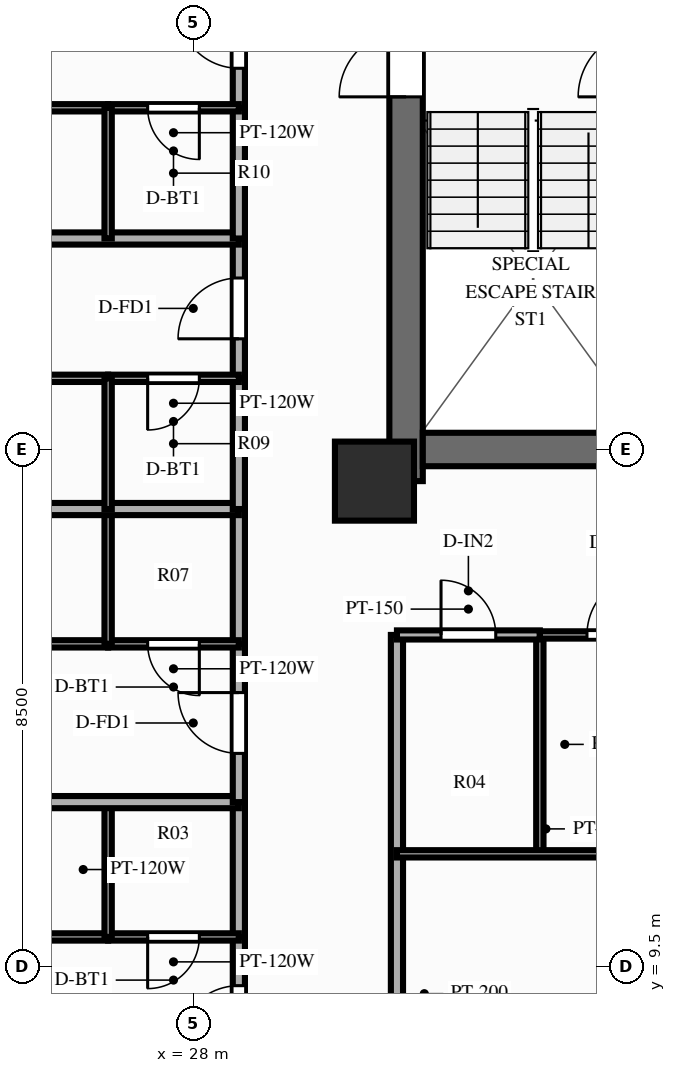
"""IFC4 building model, lengths in metres.
Left out: names, types, materials, properties, quantities, classifications, styles, units other than length and angle.
Written with IfcOpenShell. Run it as: python <this file> out.ifc"""

import sys

from ifc_helpers import new_model, si_unit, direction, frame, frame_2d, origin, origin_2d, place, context, subcontext, project, spatial, rectangle, extrude, source, transform, mapped, element, fill, save


model = new_model("IFC4")
c1 = context("Model", 3, precision=1e-05, world=origin(), true_north=direction((0.0, 1.0)))
c2 = subcontext(c1, "Body", "Model", "MODEL_VIEW")
j1 = project(units=[si_unit("LENGTHUNIT", "METRE"), si_unit("PLANEANGLEUNIT", "RADIAN")], contexts=[c1])
p1 = place(None, origin())
s1 = spatial("IfcSite", under=j1, at=p1, CompositionType="ELEMENT")
p2 = place(p1, origin())
s2 = spatial("IfcBuilding", under=s1, at=p2, CompositionType="ELEMENT")
p3 = place(p2, frame((0.0, 0.0, 126.75)))
s3 = spatial("IfcBuildingStorey", under=s2, at=p3, CompositionType="ELEMENT", Elevation=126.75)
p4 = place(p3, frame((31.5, 17.48, 0.0), z_axis=(0.0, 0.0, 1.0), x_axis=(0.0, 1.0, 0.0)))
e1 = element("IfcWall", 1, at=p4, inside=s3, PredefinedType="SHEAR", context=c2, shape_type="SweptSolid", body=[
    extrude(rectangle(XDim=19.04, YDim=0.55, at=frame_2d((9.52, 0.0))), origin(), (0.0, 0.0, 1.0), 3.0),
])
p5 = place(p4, frame((6.32, 0.0, 0.0)))
e2 = element("IfcOpeningElement", 2, at=p5, cuts=e1, PredefinedType="OPENING", context=c2, shape_type="SweptSolid", body=[
    extrude(rectangle(XDim=1.1, YDim=2.15, at=frame_2d((0.55, 1.075))), frame((0.0, 0.287, 0.0), z_axis=(0.0, -1.0, 0.0), x_axis=(1.0, 0.0, 0.0)), (0.0, 0.0, 1.0), 0.574),
])
p6 = place(p3, frame((31.775, 18.0, 0.0), z_axis=(0.0, 0.0, 1.0), x_axis=(1.0, 0.0, 0.0)))
e3 = element("IfcWall", 3, at=p6, inside=s3, PredefinedType="SHEAR", context=c2, shape_type="SweptSolid", body=[
    extrude(rectangle(XDim=12.45, YDim=0.55, at=frame_2d((6.225, 0.0))), origin(), (0.0, 0.0, 1.0), 3.0),
])
m1 = source(origin(), c2, "Body", "SweptSolid", [
    extrude(rectangle(XDim=1.3, YDim=1.3, at=origin_2d()), origin(), (0.0, 0.0, 1.0), 3.0),
])
p7 = place(p3, frame((30.98, 17.48, 0.0), z_axis=(0.0, 0.0, 1.0), x_axis=(1.0, 0.0, 0.0)))
e4 = element("IfcColumn", 4, at=p7, inside=s3, PredefinedType="COLUMN", context=c2, shape_type="MappedRepresentation", body=[
    mapped(m1, transform((0.0, 0.0, 0.0), scale=1.0)),
])
p8 = place(p3, frame((31.35, 14.95, 0.0), z_axis=(0.0, 0.0, 1.0), x_axis=(0.0, -1.0, 0.0)))
e5 = element("IfcWall", 5, at=p8, inside=s3, PredefinedType="PARTITIONING", context=c2, shape_type="SweptSolid", body=[
    extrude(rectangle(XDim=11.8, YDim=0.2, at=frame_2d((5.9, 0.0))), origin(), (0.0, 0.0, 1.0), 2.34),
])
p9 = place(p3, frame((33.7, 14.95, 0.0), z_axis=(0.0, 0.0, 1.0), x_axis=(0.0, -1.0, 0.0)))
e6 = element("IfcWall", 6, at=p9, inside=s3, PredefinedType="PARTITIONING", context=c2, shape_type="SweptSolid", body=[
    extrude(rectangle(XDim=3.6, YDim=0.12, at=frame_2d((1.8, 0.0))), origin(), (0.0, 0.0, 1.0), 2.79),
])
p10 = place(p3, frame((31.35, 11.35, 0.0), z_axis=(0.0, 0.0, 1.0), x_axis=(1.0, 0.0, 0.0)))
e7 = element("IfcWall", 7, at=p10, inside=s3, PredefinedType="PARTITIONING", context=c2, shape_type="SweptSolid", body=[
    extrude(rectangle(XDim=4.9, YDim=0.12, at=frame_2d((2.45, 0.0))), origin(), (0.0, 0.0, 1.0), 2.79),
])
p11 = place(p3, frame((31.35, 14.95, 0.0), z_axis=(0.0, 0.0, 1.0), x_axis=(1.0, 0.0, 0.0)))
e8 = element("IfcWall", 8, at=p11, inside=s3, PredefinedType="PARTITIONING", context=c2, shape_type="SweptSolid", body=[
    extrude(rectangle(XDim=2.35, YDim=0.15, at=frame_2d((1.175, 0.0))), origin(), (0.0, 0.0, 1.0), 2.79),
])
p12 = place(p11, frame((0.725, 0.0, 0.0)))
e9 = element("IfcOpeningElement", 9, at=p12, cuts=e8, PredefinedType="OPENING", context=c2, shape_type="SweptSolid", body=[
    extrude(rectangle(XDim=0.9, YDim=2.1, at=frame_2d((0.45, 1.05))), frame((0.0, 0.087, 0.0), z_axis=(0.0, -1.0, 0.0), x_axis=(1.0, 0.0, 0.0)), (0.0, 0.0, 1.0), 0.174),
])
p13 = place(p3, frame((33.7, 14.95, 0.0), z_axis=(0.0, 0.0, 1.0), x_axis=(1.0, 0.0, 0.0)))
e10 = element("IfcWall", 10, at=p13, inside=s3, PredefinedType="PARTITIONING", context=c2, shape_type="SweptSolid", body=[
    extrude(rectangle(XDim=2.55, YDim=0.12, at=frame_2d((1.275, 0.0))), origin(), (0.0, 0.0, 1.0), 2.79),
])
p14 = place(p13, frame((0.775, 0.0, 0.0)))
e11 = element("IfcOpeningElement", 11, at=p14, cuts=e10, PredefinedType="OPENING", context=c2, shape_type="SweptSolid", body=[
    extrude(rectangle(XDim=1.0, YDim=2.1, at=frame_2d((0.5, 1.05))), frame((0.0, 0.072, 0.0), z_axis=(0.0, -1.0, 0.0), x_axis=(1.0, 0.0, 0.0)), (0.0, 0.0, 1.0), 0.144),
])
p15 = place(p3, frame((28.75, 7.38, 0.0), z_axis=(0.0, 0.0, 1.0), x_axis=(0.0, 1.0, 0.0)))
e12 = element("IfcWall", 12, at=p15, inside=s3, PredefinedType="PARTITIONING", context=c2, shape_type="SweptSolid", body=[
    extrude(rectangle(XDim=2.603, YDim=0.2, at=frame_2d((1.302, 0.0))), origin(), (0.0, 0.0, 1.0), 2.79),
])
p16 = place(p15, frame((0.802, 0.0, 0.0)))
e13 = element("IfcOpeningElement", 13, at=p16, cuts=e12, PredefinedType="OPENING", context=c2, shape_type="SweptSolid", body=[
    extrude(rectangle(XDim=1.0, YDim=2.15, at=frame_2d((0.5, 1.075))), frame((0.0, 0.112, 0.0), z_axis=(0.0, -1.0, 0.0), x_axis=(1.0, 0.0, 0.0)), (0.0, 0.0, 1.0), 0.224),
])
p17 = place(p3, frame((28.75, 9.983, 0.0), z_axis=(0.0, 0.0, 1.0), x_axis=(0.0, 1.0, 0.0)))
e14 = element("IfcWall", 14, at=p17, inside=s3, PredefinedType="PARTITIONING", context=c2, shape_type="SweptSolid", body=[
    extrude(rectangle(XDim=2.218, YDim=0.2, at=frame_2d((1.109, 0.0))), origin(), (0.0, 0.0, 1.0), 2.79),
])
p18 = place(p3, frame((28.75, 9.983, 0.0), z_axis=(0.0, 0.0, 1.0), x_axis=(-1.0, 0.0, 0.0)))
e15 = element("IfcWall", 15, at=p18, inside=s3, PredefinedType="PARTITIONING", context=c2, shape_type="SweptSolid", body=[
    extrude(rectangle(XDim=2.15, YDim=0.12, at=frame_2d((1.075, 0.0))), origin(), (0.0, 0.0, 1.0), 2.79),
])
p19 = place(p18, frame((0.65, 0.0, 0.0)))
e16 = element("IfcOpeningElement", 16, at=p19, cuts=e15, PredefinedType="OPENING", context=c2, shape_type="SweptSolid", body=[
    extrude(rectangle(XDim=0.85, YDim=2.05, at=frame_2d((0.425, 1.025))), frame((0.0, 0.072, 0.0), z_axis=(0.0, -1.0, 0.0), x_axis=(1.0, 0.0, 0.0)), (0.0, 0.0, 1.0), 0.144),
])
p20 = place(p3, frame((26.6, 9.983, 0.0), z_axis=(0.0, 0.0, 1.0), x_axis=(-1.0, 0.0, 0.0)))
e17 = element("IfcWall", 17, at=p20, inside=s3, PredefinedType="PARTITIONING", context=c2, shape_type="SweptSolid", body=[
    extrude(rectangle(XDim=1.09, YDim=0.12, at=frame_2d((0.545, 0.0))), origin(), (0.0, 0.0, 1.0), 2.79),
])
p21 = place(p3, frame((26.6, 9.983, 0.0), z_axis=(0.0, 0.0, 1.0), x_axis=(0.0, 1.0, 0.0)))
e18 = element("IfcWall", 18, at=p21, inside=s3, PredefinedType="PARTITIONING", context=c2, shape_type="SweptSolid", body=[
    extrude(rectangle(XDim=2.218, YDim=0.12, at=frame_2d((1.109, 0.0))), origin(), (0.0, 0.0, 1.0), 2.79),
])
p22 = place(p3, frame((28.75, 12.2, 0.0), z_axis=(0.0, 0.0, 1.0), x_axis=(-1.0, 0.0, 0.0)))
e19 = element("IfcWall", 19, at=p22, inside=s3, PredefinedType="PARTITIONING", context=c2, shape_type="SweptSolid", body=[
    extrude(rectangle(XDim=16.6, YDim=0.2, at=frame_2d((8.3, 0.0))), origin(), (0.0, 0.0, 1.0), 2.79),
])
p23 = place(p3, frame((28.75, 12.2, 0.0), z_axis=(0.0, 0.0, 1.0), x_axis=(0.0, 1.0, 0.0)))
e20 = element("IfcWall", 20, at=p23, inside=s3, PredefinedType="PARTITIONING", context=c2, shape_type="SweptSolid", body=[
    extrude(rectangle(XDim=2.603, YDim=0.2, at=frame_2d((1.302, 0.0))), origin(), (0.0, 0.0, 1.0), 2.79),
])
p24 = place(p23, frame((0.802, 0.0, 0.0)))
e21 = element("IfcOpeningElement", 21, at=p24, cuts=e20, PredefinedType="OPENING", context=c2, shape_type="SweptSolid", body=[
    extrude(rectangle(XDim=1.0, YDim=2.15, at=frame_2d((0.5, 1.075))), frame((0.0, 0.112, 0.0), z_axis=(0.0, -1.0, 0.0), x_axis=(1.0, 0.0, 0.0)), (0.0, 0.0, 1.0), 0.224),
])
p25 = place(p3, frame((28.75, 14.803, 0.0), z_axis=(0.0, 0.0, 1.0), x_axis=(0.0, 1.0, 0.0)))
e22 = element("IfcWall", 22, at=p25, inside=s3, PredefinedType="PARTITIONING", context=c2, shape_type="SweptSolid", body=[
    extrude(rectangle(XDim=2.217, YDim=0.2, at=frame_2d((1.109, 0.0))), origin(), (0.0, 0.0, 1.0), 2.79),
])
p26 = place(p3, frame((28.75, 14.803, 0.0), z_axis=(0.0, 0.0, 1.0), x_axis=(-1.0, 0.0, 0.0)))
e23 = element("IfcWall", 23, at=p26, inside=s3, PredefinedType="PARTITIONING", context=c2, shape_type="SweptSolid", body=[
    extrude(rectangle(XDim=2.15, YDim=0.12, at=frame_2d((1.075, 0.0))), origin(), (0.0, 0.0, 1.0), 2.79),
])
p27 = place(p26, frame((0.65, 0.0, 0.0)))
e24 = element("IfcOpeningElement", 24, at=p27, cuts=e23, PredefinedType="OPENING", context=c2, shape_type="SweptSolid", body=[
    extrude(rectangle(XDim=0.85, YDim=2.05, at=frame_2d((0.425, 1.025))), frame((0.0, 0.072, 0.0), z_axis=(0.0, -1.0, 0.0), x_axis=(1.0, 0.0, 0.0)), (0.0, 0.0, 1.0), 0.144),
])
p28 = place(p3, frame((26.6, 14.803, 0.0), z_axis=(0.0, 0.0, 1.0), x_axis=(-1.0, 0.0, 0.0)))
e25 = element("IfcWall", 25, at=p28, inside=s3, PredefinedType="PARTITIONING", context=c2, shape_type="SweptSolid", body=[
    extrude(rectangle(XDim=1.09, YDim=0.12, at=frame_2d((0.545, 0.0))), origin(), (0.0, 0.0, 1.0), 2.79),
])
p29 = place(p3, frame((26.6, 14.803, 0.0), z_axis=(0.0, 0.0, 1.0), x_axis=(0.0, 1.0, 0.0)))
e26 = element("IfcWall", 26, at=p29, inside=s3, PredefinedType="PARTITIONING", context=c2, shape_type="SweptSolid", body=[
    extrude(rectangle(XDim=2.217, YDim=0.12, at=frame_2d((1.109, 0.0))), origin(), (0.0, 0.0, 1.0), 2.79),
])
p30 = place(p3, frame((28.75, 17.021, 0.0), z_axis=(0.0, 0.0, 1.0), x_axis=(-1.0, 0.0, 0.0)))
e27 = element("IfcWall", 27, at=p30, inside=s3, PredefinedType="PARTITIONING", context=c2, shape_type="SweptSolid", body=[
    extrude(rectangle(XDim=16.6, YDim=0.2, at=frame_2d((8.3, 0.0))), origin(), (0.0, 0.0, 1.0), 2.34),
])
p31 = place(p3, frame((28.75, 17.021, 0.0), z_axis=(0.0, 0.0, 1.0), x_axis=(0.0, 1.0, 0.0)))
e28 = element("IfcWall", 28, at=p31, inside=s3, PredefinedType="PARTITIONING", context=c2, shape_type="SweptSolid", body=[
    extrude(rectangle(XDim=2.15, YDim=0.2, at=frame_2d((1.075, 0.0))), origin(), (0.0, 0.0, 1.0), 2.79),
])
p32 = place(p3, frame((28.75, 19.171, 0.0), z_axis=(0.0, 0.0, 1.0), x_axis=(0.0, 1.0, 0.0)))
e29 = element("IfcWall", 29, at=p32, inside=s3, PredefinedType="PARTITIONING", context=c2, shape_type="SweptSolid", body=[
    extrude(rectangle(XDim=2.3, YDim=0.2, at=frame_2d((1.15, 0.0))), origin(), (0.0, 0.0, 1.0), 2.79),
])
p33 = place(p32, frame((0.65, 0.0, 0.0)))
e30 = element("IfcOpeningElement", 30, at=p33, cuts=e29, PredefinedType="OPENING", context=c2, shape_type="SweptSolid", body=[
    extrude(rectangle(XDim=1.0, YDim=2.15, at=frame_2d((0.5, 1.075))), frame((0.0, 0.112, 0.0), z_axis=(0.0, -1.0, 0.0), x_axis=(1.0, 0.0, 0.0)), (0.0, 0.0, 1.0), 0.224),
])
p34 = place(p3, frame((28.75, 19.171, 0.0), z_axis=(0.0, 0.0, 1.0), x_axis=(-1.0, 0.0, 0.0)))
e31 = element("IfcWall", 31, at=p34, inside=s3, PredefinedType="PARTITIONING", context=c2, shape_type="SweptSolid", body=[
    extrude(rectangle(XDim=2.15, YDim=0.12, at=frame_2d((1.075, 0.0))), origin(), (0.0, 0.0, 1.0), 2.79),
])
p35 = place(p34, frame((0.65, 0.0, 0.0)))
e32 = element("IfcOpeningElement", 32, at=p35, cuts=e31, PredefinedType="OPENING", context=c2, shape_type="SweptSolid", body=[
    extrude(rectangle(XDim=0.85, YDim=2.05, at=frame_2d((0.425, 1.025))), frame((0.0, 0.072, 0.0), z_axis=(0.0, -1.0, 0.0), x_axis=(1.0, 0.0, 0.0)), (0.0, 0.0, 1.0), 0.144),
])
p36 = place(p3, frame((26.6, 19.171, 0.0), z_axis=(0.0, 0.0, 1.0), x_axis=(-1.0, 0.0, 0.0)))
e33 = element("IfcWall", 33, at=p36, inside=s3, PredefinedType="PARTITIONING", context=c2, shape_type="SweptSolid", body=[
    extrude(rectangle(XDim=1.09, YDim=0.12, at=frame_2d((0.545, 0.0))), origin(), (0.0, 0.0, 1.0), 2.79),
])
p37 = place(p3, frame((26.6, 17.021, 0.0), z_axis=(0.0, 0.0, 1.0), x_axis=(0.0, 1.0, 0.0)))
e34 = element("IfcWall", 34, at=p37, inside=s3, PredefinedType="PARTITIONING", context=c2, shape_type="SweptSolid", body=[
    extrude(rectangle(XDim=2.15, YDim=0.12, at=frame_2d((1.075, 0.0))), origin(), (0.0, 0.0, 1.0), 2.79),
])
p38 = place(p3, frame((28.75, 21.47, 0.0), z_axis=(0.0, 0.0, 1.0), x_axis=(-1.0, 0.0, 0.0)))
e35 = element("IfcWall", 35, at=p38, inside=s3, PredefinedType="PARTITIONING", context=c2, shape_type="SweptSolid", body=[
    extrude(rectangle(XDim=16.6, YDim=0.2, at=frame_2d((8.3, 0.0))), origin(), (0.0, 0.0, 1.0), 2.79),
])
p39 = place(p3, frame((28.75, 21.47, 0.0), z_axis=(0.0, 0.0, 1.0), x_axis=(0.0, 1.0, 0.0)))
e36 = element("IfcWall", 36, at=p39, inside=s3, PredefinedType="PARTITIONING", context=c2, shape_type="SweptSolid", body=[
    extrude(rectangle(XDim=2.15, YDim=0.2, at=frame_2d((1.075, 0.0))), origin(), (0.0, 0.0, 1.0), 2.79),
])
p40 = place(p3, frame((28.75, 23.62, 0.0), z_axis=(0.0, 0.0, 1.0), x_axis=(0.0, 1.0, 0.0)))
e37 = element("IfcWall", 37, at=p40, inside=s3, PredefinedType="PARTITIONING", context=c2, shape_type="SweptSolid", body=[
    extrude(rectangle(XDim=2.3, YDim=0.2, at=frame_2d((1.15, 0.0))), origin(), (0.0, 0.0, 1.0), 2.79),
])
p41 = place(p40, frame((0.65, 0.0, 0.0)))
e38 = element("IfcOpeningElement", 38, at=p41, cuts=e37, PredefinedType="OPENING", context=c2, shape_type="SweptSolid", body=[
    extrude(rectangle(XDim=1.0, YDim=2.15, at=frame_2d((0.5, 1.075))), frame((0.0, 0.112, 0.0), z_axis=(0.0, -1.0, 0.0), x_axis=(1.0, 0.0, 0.0)), (0.0, 0.0, 1.0), 0.224),
])
p42 = place(p3, frame((28.75, 23.62, 0.0), z_axis=(0.0, 0.0, 1.0), x_axis=(-1.0, 0.0, 0.0)))
e39 = element("IfcWall", 39, at=p42, inside=s3, PredefinedType="PARTITIONING", context=c2, shape_type="SweptSolid", body=[
    extrude(rectangle(XDim=2.15, YDim=0.12, at=frame_2d((1.075, 0.0))), origin(), (0.0, 0.0, 1.0), 2.79),
])
p43 = place(p42, frame((0.65, 0.0, 0.0)))
e40 = element("IfcOpeningElement", 40, at=p43, cuts=e39, PredefinedType="OPENING", context=c2, shape_type="SweptSolid", body=[
    extrude(rectangle(XDim=0.85, YDim=2.05, at=frame_2d((0.425, 1.025))), frame((0.0, 0.072, 0.0), z_axis=(0.0, -1.0, 0.0), x_axis=(1.0, 0.0, 0.0)), (0.0, 0.0, 1.0), 0.144),
])
p44 = place(p3, frame((26.6, 23.62, 0.0), z_axis=(0.0, 0.0, 1.0), x_axis=(-1.0, 0.0, 0.0)))
e41 = element("IfcWall", 41, at=p44, inside=s3, PredefinedType="PARTITIONING", context=c2, shape_type="SweptSolid", body=[
    extrude(rectangle(XDim=1.09, YDim=0.12, at=frame_2d((0.545, 0.0))), origin(), (0.0, 0.0, 1.0), 2.79),
])
p45 = place(p3, frame((26.6, 21.47, 0.0), z_axis=(0.0, 0.0, 1.0), x_axis=(0.0, 1.0, 0.0)))
e42 = element("IfcWall", 42, at=p45, inside=s3, PredefinedType="PARTITIONING", context=c2, shape_type="SweptSolid", body=[
    extrude(rectangle(XDim=2.15, YDim=0.12, at=frame_2d((1.075, 0.0))), origin(), (0.0, 0.0, 1.0), 2.79),
])
m2 = source(origin(), c2, "Body", "SweptSolid", [
    extrude(rectangle(XDim=1.1, YDim=2.15, at=frame_2d((0.55, 1.075))), frame((0.0, 0.025, 0.0), z_axis=(0.0, -1.0, 0.0), x_axis=(1.0, 0.0, 0.0)), (0.0, 0.0, 1.0), 0.05),
])
p46 = place(p5, origin())
e43 = element("IfcDoor", 43, at=p46, inside=s3, OperationType="SINGLE_SWING_LEFT", PredefinedType="DOOR", context=c2, shape_type="MappedRepresentation", body=[
    mapped(m2, transform((0.0, 0.0, 0.0), scale=1.0)),
])
fill(e2, e43)
m3 = source(origin(), c2, "Body", "SweptSolid", [
    extrude(rectangle(XDim=0.9, YDim=2.1, at=frame_2d((0.45, 1.05))), frame((0.0, 0.025, 0.0), z_axis=(0.0, -1.0, 0.0), x_axis=(1.0, 0.0, 0.0)), (0.0, 0.0, 1.0), 0.05),
])
p47 = place(p12, origin())
e44 = element("IfcDoor", 44, at=p47, inside=s3, OperationType="SINGLE_SWING_LEFT", PredefinedType="DOOR", context=c2, shape_type="MappedRepresentation", body=[
    mapped(m3, transform((0.0, 0.0, 0.0), scale=1.0)),
])
fill(e9, e44)
m4 = source(origin(), c2, "Body", "SweptSolid", [
    extrude(rectangle(XDim=1.0, YDim=2.1, at=frame_2d((0.5, 1.05))), frame((0.0, 0.025, 0.0), z_axis=(0.0, -1.0, 0.0), x_axis=(1.0, 0.0, 0.0)), (0.0, 0.0, 1.0), 0.05),
])
p48 = place(p14, origin())
e45 = element("IfcDoor", 45, at=p48, inside=s3, OperationType="SINGLE_SWING_RIGHT", PredefinedType="DOOR", context=c2, shape_type="MappedRepresentation", body=[
    mapped(m4, transform((0.0, 0.0, 0.0), scale=1.0)),
])
fill(e11, e45)
m5 = source(origin(), c2, "Body", "SweptSolid", [
    extrude(rectangle(XDim=1.0, YDim=2.15, at=frame_2d((0.5, 1.075))), frame((0.0, 0.025, 0.0), z_axis=(0.0, -1.0, 0.0), x_axis=(1.0, 0.0, 0.0)), (0.0, 0.0, 1.0), 0.05),
])
p49 = place(p16, origin())
e46 = element("IfcDoor", 46, at=p49, inside=s3, OperationType="SINGLE_SWING_LEFT", PredefinedType="DOOR", context=c2, shape_type="MappedRepresentation", body=[
    mapped(m5, transform((0.0, 0.0, 0.0), scale=1.0)),
])
fill(e13, e46)
m6 = source(origin(), c2, "Body", "SweptSolid", [
    extrude(rectangle(XDim=0.85, YDim=2.05, at=frame_2d((0.425, 1.025))), frame((0.0, 0.025, 0.0), z_axis=(0.0, -1.0, 0.0), x_axis=(1.0, 0.0, 0.0)), (0.0, 0.0, 1.0), 0.05),
])
p50 = place(p19, origin())
e47 = element("IfcDoor", 47, at=p50, inside=s3, OperationType="SINGLE_SWING_RIGHT", PredefinedType="DOOR", context=c2, shape_type="MappedRepresentation", body=[
    mapped(m6, transform((0.0, 0.0, 0.0), scale=1.0)),
])
fill(e16, e47)
p51 = place(p24, origin())
e48 = element("IfcDoor", 48, at=p51, inside=s3, OperationType="SINGLE_SWING_RIGHT", PredefinedType="DOOR", context=c2, shape_type="MappedRepresentation", body=[
    mapped(m5, transform((0.0, 0.0, 0.0), scale=1.0)),
])
fill(e21, e48)
p52 = place(p27, origin())
e49 = element("IfcDoor", 49, at=p52, inside=s3, OperationType="SINGLE_SWING_LEFT", PredefinedType="DOOR", context=c2, shape_type="MappedRepresentation", body=[
    mapped(m6, transform((0.0, 0.0, 0.0), scale=1.0)),
])
fill(e24, e49)
p53 = place(p33, origin())
e50 = element("IfcDoor", 50, at=p53, inside=s3, OperationType="SINGLE_SWING_LEFT", PredefinedType="DOOR", context=c2, shape_type="MappedRepresentation", body=[
    mapped(m5, transform((0.0, 0.0, 0.0), scale=1.0)),
])
fill(e30, e50)
p54 = place(p35, origin())
e51 = element("IfcDoor", 51, at=p54, inside=s3, OperationType="SINGLE_SWING_RIGHT", PredefinedType="DOOR", context=c2, shape_type="MappedRepresentation", body=[
    mapped(m6, transform((0.0, 0.0, 0.0), scale=1.0)),
])
fill(e32, e51)
p55 = place(p41, origin())
e52 = element("IfcDoor", 52, at=p55, inside=s3, OperationType="SINGLE_SWING_RIGHT", PredefinedType="DOOR", context=c2, shape_type="MappedRepresentation", body=[
    mapped(m5, transform((0.0, 0.0, 0.0), scale=1.0)),
])
fill(e38, e52)
p56 = place(p43, origin())
e53 = element("IfcDoor", 53, at=p56, inside=s3, OperationType="SINGLE_SWING_LEFT", PredefinedType="DOOR", context=c2, shape_type="MappedRepresentation", body=[
    mapped(m6, transform((0.0, 0.0, 0.0), scale=1.0)),
])
fill(e40, e53)
save(model, sys.argv[1])
